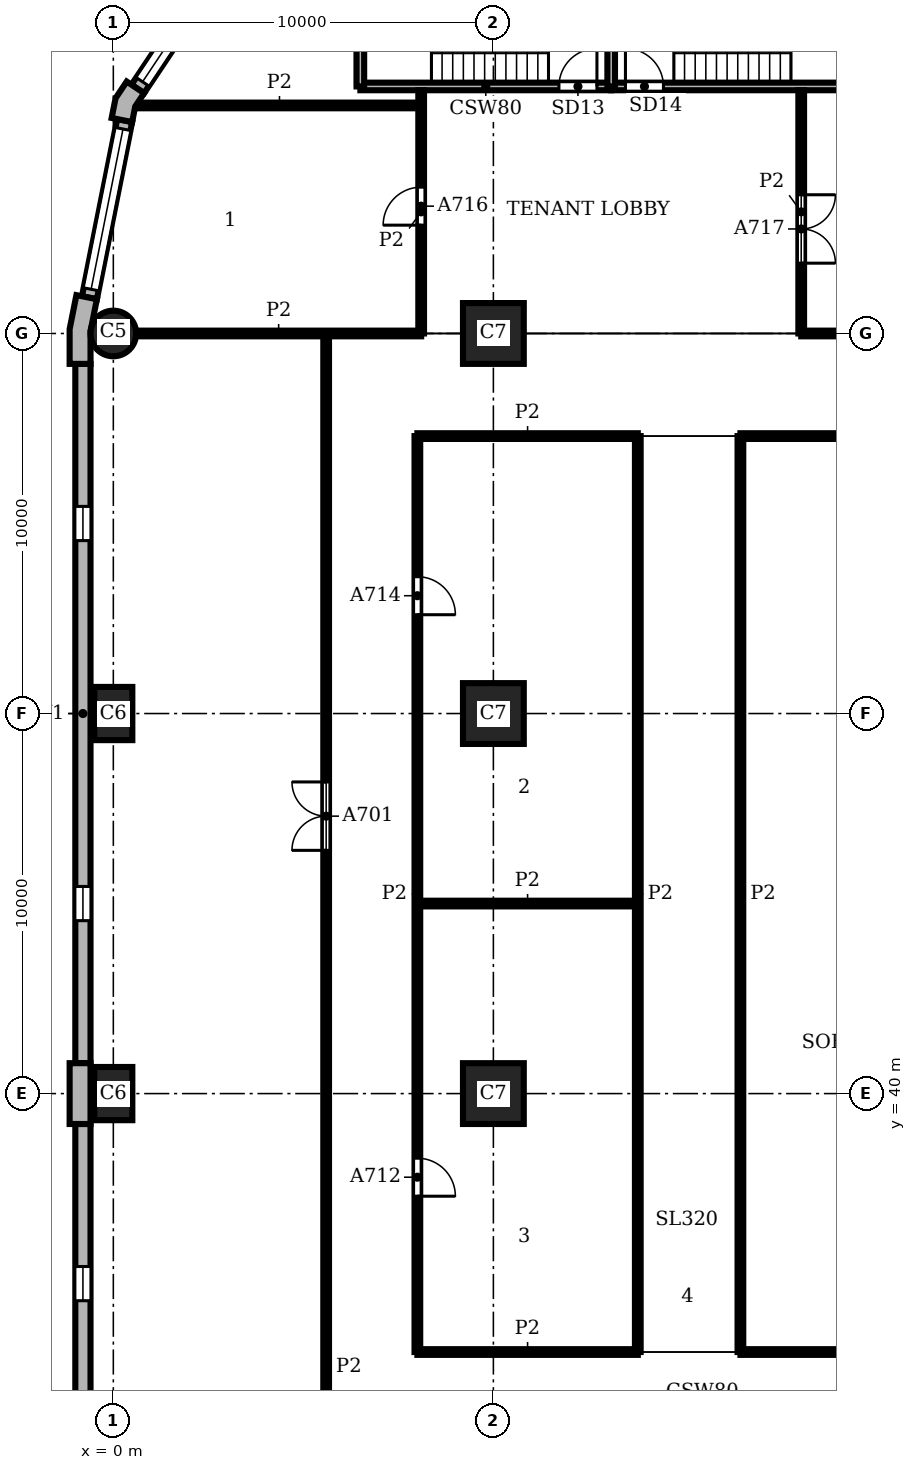
"""IFC4 building model, lengths in metres.
Left out: names, types, materials, properties, quantities, classifications, styles, units other than length and angle.
Written with IfcOpenShell. Run it as: python <this file> out.ifc"""

import sys

from ifc_helpers import new_model, si_unit, direction, frame, frame_2d, origin, origin_2d, place, context, subcontext, project, spatial, polyline, rectangle, circle, outline, extrude, element, fill, save


model = new_model("IFC4")
c1 = context("Model", 3, precision=1e-05, world=origin(), true_north=direction((0.0, 1.0)))
c2 = subcontext(c1, "Body", "Model", "MODEL_VIEW")
j1 = project(units=[si_unit("LENGTHUNIT", "METRE"), si_unit("PLANEANGLEUNIT", "RADIAN")], contexts=[c1])
p1 = place(None, origin())
s1 = spatial("IfcSite", under=j1, at=p1, CompositionType="ELEMENT")
p2 = place(p1, origin())
s2 = spatial("IfcBuilding", under=s1, at=p2, CompositionType="ELEMENT")
p3 = place(p2, frame((0.0, 0.0, 86.1)))
s3 = spatial("IfcBuildingStorey", under=s2, at=p3, CompositionType="ELEMENT", Elevation=86.1)
p4 = place(p3, frame((0.0, 60.0, 0.0), z_axis=(0.0, 0.0, 1.0), x_axis=(1.0, 0.0, 0.0)))
e1 = element("IfcColumn", 1, at=p4, inside=s3, PredefinedType="COLUMN", context=c2, shape_type="SweptSolid", body=[
    extrude(circle(Radius=0.6, at=origin_2d()), origin(), (0.0, 0.0, 1.0), 3.9),
])
for number, where, z_axis, x_axis in (
    (2, (0.0, 50.0, 0.0), (0.0, 0.0, 1.0), (0.0, 1.0, 0.0)),
    (3, (0.0, 40.0, 0.0), (0.0, 0.0, 1.0), (0.0, 1.0, 0.0)),
):
    element("IfcColumn", number, at=place(p3, frame(where, z_axis=z_axis, x_axis=x_axis)), inside=s3, PredefinedType="COLUMN", context=c2, shape_type="SweptSolid", body=[
        extrude(rectangle(XDim=1.4, YDim=1.0, at=origin_2d()), origin(), (0.0, 0.0, 1.0), 3.9),
    ])
for number, where, z_axis, x_axis in (
    (4, (10.0, 40.0, 0.0), (0.0, 0.0, 1.0), (1.0, 0.0, 0.0)),
    (5, (10.0, 50.0, 0.0), (0.0, 0.0, 1.0), (1.0, 0.0, 0.0)),
    (6, (10.0, 60.0, 0.0), (0.0, 0.0, 1.0), (1.0, 0.0, 0.0)),
):
    element("IfcColumn", number, at=place(p3, frame(where, z_axis=z_axis, x_axis=x_axis)), inside=s3, PredefinedType="COLUMN", context=c2, shape_type="SweptSolid", body=[
        extrude(rectangle(XDim=1.6, YDim=1.6, at=origin_2d()), origin(), (0.0, 0.0, 1.0), 3.9),
    ])
p5 = place(p3, origin())
e7 = element("IfcWall", 7, at=p5, inside=s3, PredefinedType="SOLIDWALL", context=c2, shape_type="SweptSolid", body=[
    extrude(outline(polyline([(0.477, 66.545), (0.352, 66.629), (0.059, 66.189), (-0.045, 65.67), (0.103, 65.641), (0.495, 65.563), (0.577, 65.974), (0.81, 66.323), (0.477, 66.545)])), origin(), (0.0, 0.0, 1.0), 3.9),
])
e8 = element("IfcWall", 8, at=p5, inside=s3, PredefinedType="SOLIDWALL", context=c2, shape_type="SweptSolid", body=[
    extrude(outline(polyline([(-0.825, 60.98), (-0.972, 61.009), (-1.15, 60.113), (-1.15, 59.2), (-1.0, 59.2), (-0.6, 59.2), (-0.6, 60.059), (-0.432, 60.902), (-0.825, 60.98)])), origin(), (0.0, 0.0, 1.0), 3.9),
])
e9 = element("IfcWall", 9, at=p5, inside=s3, PredefinedType="SOLIDWALL", context=c2, shape_type="SweptSolid", body=[
    extrude(outline(polyline([(-1.0, 40.8), (-1.15, 40.8), (-1.15, 40.0), (-1.15, 39.2), (-1.0, 39.2), (-0.6, 39.2), (-0.6, 40.0), (-0.6, 40.8), (-1.0, 40.8)])), origin(), (0.0, 0.0, 1.0), 3.9),
])
p6 = place(p3, frame((3.284, 70.386, 0.0), z_axis=(0.0, 0.0, 1.0), x_axis=(-0.555541552266, -0.831488775454, 0.0)))
e10 = element("IfcWall", 10, at=p6, inside=s3, PredefinedType="SOLIDWALL", context=c2, shape_type="SweptSolid", body=[
    extrude(rectangle(XDim=4.753, YDim=0.4, at=frame_2d((2.376, 0.0))), origin(), (0.0, 0.0, 1.0), 3.9),
])
p7 = place(p6, frame((0.226, 0.0, 0.9)))
e11 = element("IfcOpeningElement", 11, at=p7, cuts=e10, PredefinedType="OPENING", context=c2, shape_type="SweptSolid", body=[
    extrude(rectangle(XDim=4.3, YDim=2.35, at=frame_2d((2.15, 1.175))), frame((0.0, 0.21, 0.0), z_axis=(0.0, -1.0, 0.0), x_axis=(1.0, 0.0, 0.0)), (0.0, 0.0, 1.0), 0.42),
])
p8 = place(p3, frame((0.299, 65.602, 0.0), z_axis=(0.0, 0.0, 1.0), x_axis=(-0.195098533057, -0.98078364709, 0.0)))
e12 = element("IfcWall", 12, at=p8, inside=s3, PredefinedType="SOLIDWALL", context=c2, shape_type="SweptSolid", body=[
    extrude(rectangle(XDim=4.753, YDim=0.4, at=frame_2d((2.376, 0.0))), origin(), (0.0, 0.0, 1.0), 3.9),
])
p9 = place(p8, frame((0.226, 0.0, 0.9)))
e13 = element("IfcOpeningElement", 13, at=p9, cuts=e12, PredefinedType="OPENING", context=c2, shape_type="SweptSolid", body=[
    extrude(rectangle(XDim=4.3, YDim=2.35, at=frame_2d((2.15, 1.175))), frame((0.0, 0.21, 0.0), z_axis=(0.0, -1.0, 0.0), x_axis=(1.0, 0.0, 0.0)), (0.0, 0.0, 1.0), 0.42),
])
p10 = place(p3, frame((-0.8, 59.2, 0.0), z_axis=(0.0, 0.0, 1.0), x_axis=(0.0, -1.0, 0.0)))
e14 = element("IfcWall", 14, at=p10, inside=s3, PredefinedType="SOLIDWALL", context=c2, shape_type="SweptSolid", body=[
    extrude(rectangle(XDim=18.4, YDim=0.4, at=frame_2d((9.2, 0.0))), origin(), (0.0, 0.0, 1.0), 3.9),
])
p11 = place(p10, frame((3.75, 0.0, 0.9)))
e15 = element("IfcOpeningElement", 15, at=p11, cuts=e14, PredefinedType="OPENING", context=c2, shape_type="SweptSolid", body=[
    extrude(rectangle(XDim=0.9, YDim=2.35, at=frame_2d((0.45, 1.175))), frame((0.0, 0.21, 0.0), z_axis=(0.0, -1.0, 0.0), x_axis=(1.0, 0.0, 0.0)), (0.0, 0.0, 1.0), 0.42),
])
p12 = place(p10, frame((13.75, 0.0, 0.9)))
e16 = element("IfcOpeningElement", 16, at=p12, cuts=e14, PredefinedType="OPENING", context=c2, shape_type="SweptSolid", body=[
    extrude(rectangle(XDim=0.9, YDim=2.35, at=frame_2d((0.45, 1.175))), frame((0.0, 0.21, 0.0), z_axis=(0.0, -1.0, 0.0), x_axis=(1.0, 0.0, 0.0)), (0.0, 0.0, 1.0), 0.42),
])
p13 = place(p3, frame((-0.8, 39.2, 0.0), z_axis=(0.0, 0.0, 1.0), x_axis=(0.0, -1.0, 0.0)))
e17 = element("IfcWall", 17, at=p13, inside=s3, PredefinedType="SOLIDWALL", context=c2, shape_type="SweptSolid", body=[
    extrude(rectangle(XDim=18.4, YDim=0.4, at=frame_2d((9.2, 0.0))), origin(), (0.0, 0.0, 1.0), 3.9),
])
p14 = place(p13, frame((3.75, 0.0, 0.9)))
e18 = element("IfcOpeningElement", 18, at=p14, cuts=e17, PredefinedType="OPENING", context=c2, shape_type="SweptSolid", body=[
    extrude(rectangle(XDim=0.9, YDim=2.35, at=frame_2d((0.45, 1.175))), frame((0.0, 0.21, 0.0), z_axis=(0.0, -1.0, 0.0), x_axis=(1.0, 0.0, 0.0)), (0.0, 0.0, 1.0), 0.42),
])
p15 = place(p13, frame((13.75, 0.0, 0.9)))
e19 = element("IfcOpeningElement", 19, at=p15, cuts=e17, PredefinedType="OPENING", context=c2, shape_type="SweptSolid", body=[
    extrude(rectangle(XDim=0.9, YDim=2.35, at=frame_2d((0.45, 1.175))), frame((0.0, 0.21, 0.0), z_axis=(0.0, -1.0, 0.0), x_axis=(1.0, 0.0, 0.0)), (0.0, 0.0, 1.0), 0.42),
])
p16 = place(p3, frame((6.5, 66.5, 0.0), z_axis=(0.0, 0.0, 1.0), x_axis=(1.0, 0.0, 0.0)))
e20 = element("IfcWall", 20, at=p16, inside=s3, PredefinedType="SHEAR", context=c2, shape_type="SweptSolid", body=[
    extrude(rectangle(XDim=6.6, YDim=0.2, at=frame_2d((3.3, 0.0))), origin(), (0.0, 0.0, 1.0), 3.58),
])
p17 = place(p16, frame((5.225, 0.0, 0.0)))
e21 = element("IfcOpeningElement", 21, at=p17, cuts=e20, PredefinedType="OPENING", context=c2, shape_type="SweptSolid", body=[
    extrude(rectangle(XDim=1.0, YDim=2.1, at=frame_2d((0.5, 1.05))), frame((0.0, 0.11, 0.0), z_axis=(0.0, -1.0, 0.0), x_axis=(1.0, 0.0, 0.0)), (0.0, 0.0, 1.0), 0.22),
])
p18 = place(p3, frame((13.1, 66.5, 0.0), z_axis=(0.0, 0.0, 1.0), x_axis=(1.0, 0.0, 0.0)))
e22 = element("IfcWall", 22, at=p18, inside=s3, PredefinedType="SHEAR", context=c2, shape_type="SweptSolid", body=[
    extrude(rectangle(XDim=6.6, YDim=0.2, at=frame_2d((3.3, 0.0))), origin(), (0.0, 0.0, 1.0), 3.58),
])
p19 = place(p18, frame((0.375, 0.0, 0.0)))
e23 = element("IfcOpeningElement", 23, at=p19, cuts=e22, PredefinedType="OPENING", context=c2, shape_type="SweptSolid", body=[
    extrude(rectangle(XDim=1.0, YDim=2.1, at=frame_2d((0.5, 1.05))), frame((0.0, 0.11, 0.0), z_axis=(0.0, -1.0, 0.0), x_axis=(1.0, 0.0, 0.0)), (0.0, 0.0, 1.0), 0.22),
])
for number, where, z_axis, x_axis in (
    (24, (6.5, 66.5, 0.0), (0.0, 0.0, 1.0), (0.0, 1.0, 0.0)),
    (25, (13.1, 66.5, 0.0), (0.0, 0.0, 1.0), (0.0, 1.0, 0.0)),
):
    element("IfcWall", number, at=place(p3, frame(where, z_axis=z_axis, x_axis=x_axis)), inside=s3, PredefinedType="SHEAR", context=c2, shape_type="SweptSolid", body=[
        extrude(rectangle(XDim=3.3, YDim=0.2, at=frame_2d((1.65, 0.0))), origin(), (0.0, 0.0, 1.0), 3.58),
    ])
p20 = place(p3, frame((5.6, 5.6, 0.0), z_axis=(0.0, 0.0, 1.0), x_axis=(0.0, 1.0, 0.0)))
e26 = element("IfcWall", 26, at=p20, inside=s3, PredefinedType="PARTITIONING", context=c2, shape_type="SweptSolid", body=[
    extrude(rectangle(XDim=54.4, YDim=0.15, at=frame_2d((27.2, 0.0))), origin(), (0.0, 0.0, 1.0), 3.58),
])
p21 = place(p20, frame((40.8, 0.0, 0.0)))
e27 = element("IfcOpeningElement", 27, at=p21, cuts=e26, PredefinedType="OPENING", context=c2, shape_type="SweptSolid", body=[
    extrude(rectangle(XDim=1.8, YDim=2.1, at=frame_2d((0.9, 1.05))), frame((0.0, 0.085, 0.0), z_axis=(0.0, -1.0, 0.0), x_axis=(1.0, 0.0, 0.0)), (0.0, 0.0, 1.0), 0.17),
])
p22 = place(p3, frame((8.0, 33.2, 0.0), z_axis=(0.0, 0.0, 1.0), x_axis=(0.0, 1.0, 0.0)))
e28 = element("IfcWall", 28, at=p22, inside=s3, PredefinedType="PARTITIONING", context=c2, shape_type="SweptSolid", body=[
    extrude(rectangle(XDim=24.1, YDim=0.15, at=frame_2d((12.05, 0.0))), origin(), (0.0, 0.0, 1.0), 3.58),
])
p23 = place(p22, frame((4.1, 0.0, 0.0)))
e29 = element("IfcOpeningElement", 29, at=p23, cuts=e28, PredefinedType="OPENING", context=c2, shape_type="SweptSolid", body=[
    extrude(rectangle(XDim=1.0, YDim=2.1, at=frame_2d((0.5, 1.05))), frame((0.0, 0.085, 0.0), z_axis=(0.0, -1.0, 0.0), x_axis=(1.0, 0.0, 0.0)), (0.0, 0.0, 1.0), 0.17),
])
p24 = place(p22, frame((19.4, 0.0, 0.0)))
e30 = element("IfcOpeningElement", 30, at=p24, cuts=e28, PredefinedType="OPENING", context=c2, shape_type="SweptSolid", body=[
    extrude(rectangle(XDim=1.0, YDim=2.1, at=frame_2d((0.5, 1.05))), frame((0.0, 0.085, 0.0), z_axis=(0.0, -1.0, 0.0), x_axis=(1.0, 0.0, 0.0)), (0.0, 0.0, 1.0), 0.17),
])
p25 = place(p3, frame((8.1, 60.0, 0.0), z_axis=(0.0, 0.0, 1.0), x_axis=(0.0, 1.0, 0.0)))
e31 = element("IfcWall", 31, at=p25, inside=s3, PredefinedType="PARTITIONING", context=c2, shape_type="SweptSolid", body=[
    extrude(rectangle(XDim=6.4, YDim=0.15, at=frame_2d((3.2, 0.0))), origin(), (0.0, 0.0, 1.0), 3.58),
])
p26 = place(p25, frame((2.85, 0.0, 0.0)))
e32 = element("IfcOpeningElement", 32, at=p26, cuts=e31, PredefinedType="OPENING", context=c2, shape_type="SweptSolid", body=[
    extrude(rectangle(XDim=1.0, YDim=2.1, at=frame_2d((0.5, 1.05))), frame((0.0, 0.085, 0.0), z_axis=(0.0, -1.0, 0.0), x_axis=(1.0, 0.0, 0.0)), (0.0, 0.0, 1.0), 0.17),
])
for number, where, z_axis, x_axis in (
    (33, (13.8, 33.2, 0.0), (0.0, 0.0, 1.0), (0.0, 1.0, 0.0)),
    (34, (16.5, 33.2, 0.0), (0.0, 0.0, 1.0), (0.0, 1.0, 0.0)),
):
    element("IfcWall", number, at=place(p3, frame(where, z_axis=z_axis, x_axis=x_axis)), inside=s3, PredefinedType="PARTITIONING", context=c2, shape_type="SweptSolid", body=[
        extrude(rectangle(XDim=24.1, YDim=0.15, at=frame_2d((12.05, 0.0))), origin(), (0.0, 0.0, 1.0), 3.58),
    ])
p27 = place(p3, frame((18.1, 60.0, 0.0), z_axis=(0.0, 0.0, 1.0), x_axis=(0.0, 1.0, 0.0)))
e35 = element("IfcWall", 35, at=p27, inside=s3, PredefinedType="PARTITIONING", context=c2, shape_type="SweptSolid", body=[
    extrude(rectangle(XDim=6.4, YDim=0.15, at=frame_2d((3.2, 0.0))), origin(), (0.0, 0.0, 1.0), 3.58),
])
p28 = place(p27, frame((1.85, 0.0, 0.0)))
e36 = element("IfcOpeningElement", 36, at=p28, cuts=e35, PredefinedType="OPENING", context=c2, shape_type="SweptSolid", body=[
    extrude(rectangle(XDim=1.8, YDim=2.1, at=frame_2d((0.9, 1.05))), frame((0.0, 0.085, 0.0), z_axis=(0.0, -1.0, 0.0), x_axis=(1.0, 0.0, 0.0)), (0.0, 0.0, 1.0), 0.17),
])
p29 = place(p3, frame((8.0, 33.2, 0.0), z_axis=(0.0, 0.0, 1.0), x_axis=(1.0, 0.0, 0.0)))
e37 = element("IfcWall", 37, at=p29, inside=s3, PredefinedType="PARTITIONING", context=c2, shape_type="SweptSolid", body=[
    extrude(rectangle(XDim=5.8, YDim=0.15, at=frame_2d((2.9, 0.0))), origin(), (0.0, 0.0, 1.0), 3.58),
])
p30 = place(p3, frame((16.5, 33.2, 0.0), z_axis=(0.0, 0.0, 1.0), x_axis=(1.0, 0.0, 0.0)))
e38 = element("IfcWall", 38, at=p30, inside=s3, PredefinedType="PARTITIONING", context=c2, shape_type="SweptSolid", body=[
    extrude(rectangle(XDim=15.862, YDim=0.15, at=frame_2d((7.931, 0.0))), origin(), (0.0, 0.0, 1.0), 3.58),
])
p31 = place(p30, frame((4.6, 0.0, 0.0)))
e39 = element("IfcOpeningElement", 39, at=p31, cuts=e38, PredefinedType="OPENING", context=c2, shape_type="SweptSolid", body=[
    extrude(rectangle(XDim=1.8, YDim=2.1, at=frame_2d((0.9, 1.05))), frame((0.0, 0.085, 0.0), z_axis=(0.0, -1.0, 0.0), x_axis=(1.0, 0.0, 0.0)), (0.0, 0.0, 1.0), 0.17),
])
p32 = place(p30, frame((14.45, 0.0, 0.0)))
e40 = element("IfcOpeningElement", 40, at=p32, cuts=e38, PredefinedType="OPENING", context=c2, shape_type="SweptSolid", body=[
    extrude(rectangle(XDim=1.0, YDim=2.1, at=frame_2d((0.5, 1.05))), frame((0.0, 0.085, 0.0), z_axis=(0.0, -1.0, 0.0), x_axis=(1.0, 0.0, 0.0)), (0.0, 0.0, 1.0), 0.17),
])
for number, where, z_axis, x_axis in (
    (41, (8.0, 45.0, 0.0), (0.0, 0.0, 1.0), (1.0, 0.0, 0.0)),
    (42, (8.0, 57.3, 0.0), (0.0, 0.0, 1.0), (1.0, 0.0, 0.0)),
):
    element("IfcWall", number, at=place(p3, frame(where, z_axis=z_axis, x_axis=x_axis)), inside=s3, PredefinedType="PARTITIONING", context=c2, shape_type="SweptSolid", body=[
        extrude(rectangle(XDim=5.8, YDim=0.15, at=frame_2d((2.9, 0.0))), origin(), (0.0, 0.0, 1.0), 3.58),
    ])
p33 = place(p3, frame((16.5, 57.3, 0.0), z_axis=(0.0, 0.0, 1.0), x_axis=(1.0, 0.0, 0.0)))
e43 = element("IfcWall", 43, at=p33, inside=s3, PredefinedType="PARTITIONING", context=c2, shape_type="SweptSolid", body=[
    extrude(rectangle(XDim=8.5, YDim=0.15, at=frame_2d((4.25, 0.0))), origin(), (0.0, 0.0, 1.0), 3.58),
])
p34 = place(p3, frame((0.6, 60.0, 0.0), z_axis=(0.0, 0.0, 1.0), x_axis=(1.0, 0.0, 0.0)))
e44 = element("IfcWall", 44, at=p34, inside=s3, PredefinedType="PARTITIONING", context=c2, shape_type="SweptSolid", body=[
    extrude(rectangle(XDim=7.5, YDim=0.15, at=frame_2d((3.75, 0.0))), origin(), (0.0, 0.0, 1.0), 3.58),
])
p35 = place(p3, frame((18.1, 60.0, 0.0), z_axis=(0.0, 0.0, 1.0), x_axis=(1.0, 0.0, 0.0)))
e45 = element("IfcWall", 45, at=p35, inside=s3, PredefinedType="PARTITIONING", context=c2, shape_type="SweptSolid", body=[
    extrude(rectangle(XDim=1.1, YDim=0.15, at=frame_2d((0.55, 0.0))), origin(), (0.0, 0.0, 1.0), 3.58),
])
p36 = place(p3, frame((0.644, 66.0, 0.0), z_axis=(0.0, 0.0, 1.0), x_axis=(1.0, 0.0, 0.0)))
e46 = element("IfcWall", 46, at=p36, inside=s3, PredefinedType="PARTITIONING", context=c2, shape_type="SweptSolid", body=[
    extrude(rectangle(XDim=7.456, YDim=0.15, at=frame_2d((3.728, 0.0))), origin(), (0.0, 0.0, 1.0), 3.58),
])
p37 = place(p7, origin())
e47 = element("IfcWindow", 47, at=p37, inside=s3, PartitioningType="SINGLE_PANEL", PredefinedType="WINDOW", context=c2, shape_type="SweptSolid", body=[
    extrude(rectangle(XDim=4.3, YDim=2.35, at=frame_2d((2.15, 1.175))), frame((0.0, 0.16, 0.0), z_axis=(0.0, -1.0, 0.0), x_axis=(1.0, 0.0, 0.0)), (0.0, 0.0, 1.0), 0.06),
])
fill(e11, e47)
p38 = place(p9, origin())
e48 = element("IfcWindow", 48, at=p38, inside=s3, PartitioningType="SINGLE_PANEL", PredefinedType="WINDOW", context=c2, shape_type="SweptSolid", body=[
    extrude(rectangle(XDim=4.3, YDim=2.35, at=frame_2d((2.15, 1.175))), frame((0.0, 0.16, 0.0), z_axis=(0.0, -1.0, 0.0), x_axis=(1.0, 0.0, 0.0)), (0.0, 0.0, 1.0), 0.06),
])
fill(e13, e48)
p39 = place(p11, origin())
e49 = element("IfcWindow", 49, at=p39, inside=s3, PartitioningType="SINGLE_PANEL", PredefinedType="WINDOW", context=c2, shape_type="SweptSolid", body=[
    extrude(rectangle(XDim=0.9, YDim=2.35, at=frame_2d((0.45, 1.175))), frame((0.0, 0.16, 0.0), z_axis=(0.0, -1.0, 0.0), x_axis=(1.0, 0.0, 0.0)), (0.0, 0.0, 1.0), 0.06),
])
fill(e15, e49)
p40 = place(p12, origin())
e50 = element("IfcWindow", 50, at=p40, inside=s3, PartitioningType="SINGLE_PANEL", PredefinedType="WINDOW", context=c2, shape_type="SweptSolid", body=[
    extrude(rectangle(XDim=0.9, YDim=2.35, at=frame_2d((0.45, 1.175))), frame((0.0, 0.16, 0.0), z_axis=(0.0, -1.0, 0.0), x_axis=(1.0, 0.0, 0.0)), (0.0, 0.0, 1.0), 0.06),
])
fill(e16, e50)
p41 = place(p14, origin())
e51 = element("IfcWindow", 51, at=p41, inside=s3, PartitioningType="SINGLE_PANEL", PredefinedType="WINDOW", context=c2, shape_type="SweptSolid", body=[
    extrude(rectangle(XDim=0.9, YDim=2.35, at=frame_2d((0.45, 1.175))), frame((0.0, 0.16, 0.0), z_axis=(0.0, -1.0, 0.0), x_axis=(1.0, 0.0, 0.0)), (0.0, 0.0, 1.0), 0.06),
])
fill(e18, e51)
p42 = place(p17, origin())
e52 = element("IfcDoor", 52, at=p42, inside=s3, OperationType="SINGLE_SWING_RIGHT", PredefinedType="DOOR", context=c2, shape_type="SweptSolid", body=[
    extrude(rectangle(XDim=1.0, YDim=2.1, at=frame_2d((0.5, 1.05))), frame((0.0, 0.025, 0.0), z_axis=(0.0, -1.0, 0.0), x_axis=(1.0, 0.0, 0.0)), (0.0, 0.0, 1.0), 0.05),
])
fill(e21, e52)
p43 = place(p19, origin())
e53 = element("IfcDoor", 53, at=p43, inside=s3, OperationType="SINGLE_SWING_LEFT", PredefinedType="DOOR", context=c2, shape_type="SweptSolid", body=[
    extrude(rectangle(XDim=1.0, YDim=2.1, at=frame_2d((0.5, 1.05))), frame((0.0, 0.025, 0.0), z_axis=(0.0, -1.0, 0.0), x_axis=(1.0, 0.0, 0.0)), (0.0, 0.0, 1.0), 0.05),
])
fill(e23, e53)
p44 = place(p21, origin())
e54 = element("IfcDoor", 54, at=p44, inside=s3, OperationType="DOUBLE_DOOR_SINGLE_SWING", PredefinedType="DOOR", context=c2, shape_type="SweptSolid", body=[
    extrude(rectangle(XDim=1.8, YDim=2.1, at=frame_2d((0.9, 1.05))), frame((0.0, 0.025, 0.0), z_axis=(0.0, -1.0, 0.0), x_axis=(1.0, 0.0, 0.0)), (0.0, 0.0, 1.0), 0.05),
])
fill(e27, e54)
p45 = place(p23, frame((1.0, 0.0, 0.0), z_axis=(0.0, 0.0, 1.0), x_axis=(-1.0, 0.0, 0.0)))
e55 = element("IfcDoor", 55, at=p45, inside=s3, OperationType="SINGLE_SWING_RIGHT", PredefinedType="DOOR", context=c2, shape_type="SweptSolid", body=[
    extrude(rectangle(XDim=1.0, YDim=2.1, at=frame_2d((0.5, 1.05))), frame((0.0, 0.025, 0.0), z_axis=(0.0, -1.0, 0.0), x_axis=(1.0, 0.0, 0.0)), (0.0, 0.0, 1.0), 0.05),
])
fill(e29, e55)
p46 = place(p24, frame((1.0, 0.0, 0.0), z_axis=(0.0, 0.0, 1.0), x_axis=(-1.0, 0.0, 0.0)))
e56 = element("IfcDoor", 56, at=p46, inside=s3, OperationType="SINGLE_SWING_RIGHT", PredefinedType="DOOR", context=c2, shape_type="SweptSolid", body=[
    extrude(rectangle(XDim=1.0, YDim=2.1, at=frame_2d((0.5, 1.05))), frame((0.0, 0.025, 0.0), z_axis=(0.0, -1.0, 0.0), x_axis=(1.0, 0.0, 0.0)), (0.0, 0.0, 1.0), 0.05),
])
fill(e30, e56)
p47 = place(p26, origin())
e57 = element("IfcDoor", 57, at=p47, inside=s3, OperationType="SINGLE_SWING_LEFT", PredefinedType="DOOR", context=c2, shape_type="SweptSolid", body=[
    extrude(rectangle(XDim=1.0, YDim=2.1, at=frame_2d((0.5, 1.05))), frame((0.0, 0.025, 0.0), z_axis=(0.0, -1.0, 0.0), x_axis=(1.0, 0.0, 0.0)), (0.0, 0.0, 1.0), 0.05),
])
fill(e32, e57)
p48 = place(p28, frame((1.8, 0.0, 0.0), z_axis=(0.0, 0.0, 1.0), x_axis=(-1.0, 0.0, 0.0)))
e58 = element("IfcDoor", 58, at=p48, inside=s3, OperationType="DOUBLE_DOOR_SINGLE_SWING", PredefinedType="DOOR", context=c2, shape_type="SweptSolid", body=[
    extrude(rectangle(XDim=1.8, YDim=2.1, at=frame_2d((0.9, 1.05))), frame((0.0, 0.025, 0.0), z_axis=(0.0, -1.0, 0.0), x_axis=(1.0, 0.0, 0.0)), (0.0, 0.0, 1.0), 0.05),
])
fill(e36, e58)
save(model, sys.argv[1])
